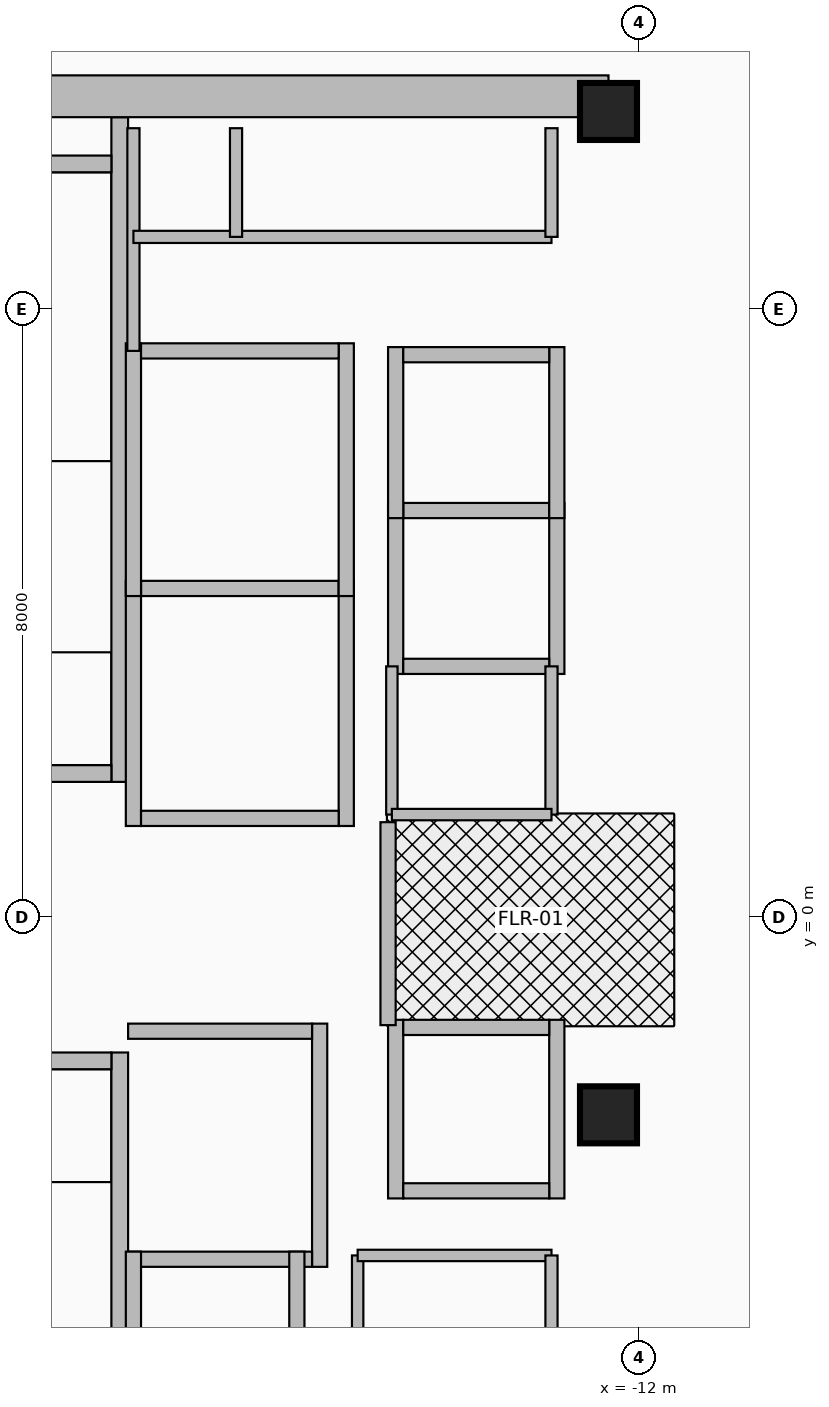
"""IFC4 building model, lengths in metres.
Left out: names, types, materials, properties, quantities, classifications, styles, units other than length and angle.
Written with IfcOpenShell. Run it as: python <this file> out.ifc"""

import sys

from ifc_helpers import new_model, si_unit, direction, frame, frame_2d, origin, origin_2d, place, context, subcontext, project, spatial, rectangle, extrude, source, transform, mapped, element, fill, save


model = new_model("IFC4")
c1 = context("Model", 3, precision=1e-05, world=origin(), true_north=direction((0.0, 1.0)))
c2 = subcontext(c1, "Body", "Model", "MODEL_VIEW")
j1 = project(units=[si_unit("LENGTHUNIT", "METRE"), si_unit("PLANEANGLEUNIT", "RADIAN")], contexts=[c1])
p1 = place(None, origin())
s1 = spatial("IfcSite", under=j1, at=p1, CompositionType="ELEMENT")
p2 = place(p1, origin())
s2 = spatial("IfcBuilding", under=s1, at=p2, CompositionType="ELEMENT")
p3 = place(p2, frame((0.0, 0.0, 290.6)))
s3 = spatial("IfcBuildingStorey", under=s2, at=p3, CompositionType="ELEMENT", Elevation=290.6)
p4 = place(p3, frame((-18.83, 1.78, 0.0), z_axis=(0.0, 0.0, 1.0), x_axis=(0.0, 1.0, 0.0)))
e1 = element("IfcWall", 1, at=p4, inside=s3, PredefinedType="SHEAR", context=c2, shape_type="SweptSolid", body=[
    extrude(rectangle(XDim=8.745, YDim=0.22, at=frame_2d((4.373, 0.0))), origin(), (0.0, 0.0, 1.0), 3.36),
])
p5 = place(p3, frame((-22.05, 1.89, 0.0), z_axis=(0.0, 0.0, 1.0), x_axis=(1.0, 0.0, 0.0)))
e2 = element("IfcWall", 2, at=p5, inside=s3, PredefinedType="SHEAR", context=c2, shape_type="SweptSolid", body=[
    extrude(rectangle(XDim=3.11, YDim=0.22, at=frame_2d((1.555, 0.0))), origin(), (0.0, 0.0, 1.0), 3.36),
])
p6 = place(p5, frame((1.0, 0.0, 0.0)))
e3 = element("IfcOpeningElement", 3, at=p6, cuts=e2, PredefinedType="OPENING", context=c2, shape_type="SweptSolid", body=[
    extrude(rectangle(XDim=1.1, YDim=2.15, at=frame_2d((0.55, 1.075))), frame((0.0, 0.125, 0.0), z_axis=(0.0, -1.0, 0.0), x_axis=(1.0, 0.0, 0.0)), (0.0, 0.0, 1.0), 0.25),
])
p7 = place(p3, frame((-22.05, 9.91, 0.0), z_axis=(0.0, 0.0, 1.0), x_axis=(1.0, 0.0, 0.0)))
e4 = element("IfcWall", 4, at=p7, inside=s3, PredefinedType="SHEAR", context=c2, shape_type="SweptSolid", body=[
    extrude(rectangle(XDim=3.11, YDim=0.22, at=frame_2d((1.555, 0.0))), origin(), (0.0, 0.0, 1.0), 3.36),
])
p8 = place(p3, frame((-18.83, -10.525, 0.0), z_axis=(0.0, 0.0, 1.0), x_axis=(0.0, 1.0, 0.0)))
e5 = element("IfcWall", 5, at=p8, inside=s3, PredefinedType="SHEAR", context=c2, shape_type="SweptSolid", body=[
    extrude(rectangle(XDim=8.745, YDim=0.22, at=frame_2d((4.373, 0.0))), origin(), (0.0, 0.0, 1.0), 3.36),
])
p9 = place(p3, frame((-22.05, -1.89, 0.0), z_axis=(0.0, 0.0, 1.0), x_axis=(1.0, 0.0, 0.0)))
e6 = element("IfcWall", 6, at=p9, inside=s3, PredefinedType="SHEAR", context=c2, shape_type="SweptSolid", body=[
    extrude(rectangle(XDim=3.11, YDim=0.22, at=frame_2d((1.555, 0.0))), origin(), (0.0, 0.0, 1.0), 3.36),
])
p10 = place(p9, frame((1.0, 0.0, 0.0)))
e7 = element("IfcOpeningElement", 7, at=p10, cuts=e6, PredefinedType="OPENING", context=c2, shape_type="SweptSolid", body=[
    extrude(rectangle(XDim=1.1, YDim=2.15, at=frame_2d((0.55, 1.075))), frame((0.0, 0.125, 0.0), z_axis=(0.0, -1.0, 0.0), x_axis=(1.0, 0.0, 0.0)), (0.0, 0.0, 1.0), 0.25),
])
p11 = place(p3, frame((-22.65, 10.8, 0.0), z_axis=(0.0, 0.0, 1.0), x_axis=(1.0, 0.0, 0.0)))
e8 = element("IfcWall", 8, at=p11, inside=s3, PredefinedType="SHEAR", context=c2, shape_type="SweptSolid", body=[
    extrude(rectangle(XDim=10.25, YDim=0.55, at=frame_2d((5.125, 0.0))), origin(), (0.0, 0.0, 1.0), 3.36),
])
m1 = source(origin(), c2, "Body", "SweptSolid", [
    extrude(rectangle(XDim=0.75, YDim=0.75, at=origin_2d()), origin(), (0.0, 0.0, 1.0), 3.6),
])
for number, where, z_axis, x_axis in (
    (9, (-12.4, -2.6, 0.0), (0.0, 0.0, 1.0), (1.0, 0.0, 0.0)),
    (10, (-12.4, 10.6, 0.0), (0.0, 0.0, 1.0), (1.0, 0.0, 0.0)),
):
    element("IfcColumn", number, at=place(p3, frame(where, z_axis=z_axis, x_axis=x_axis)), inside=s3, PredefinedType="COLUMN", context=c2, shape_type="MappedRepresentation", body=[
        mapped(m1, transform((0.0, 0.0, 0.0), x_axis=(1.0, 0.0, 0.0), y_axis=(0.0, 1.0, 0.0), z_axis=(0.0, 0.0, 1.0), scale=1.0)),
    ])
for number, where, z_axis, x_axis in (
    (11, (-18.65, 1.2, 0.0), (0.0, 0.0, 1.0), (0.0, 1.0, 0.0)),
    (12, (-15.85, 1.2, 0.0), (0.0, 0.0, 1.0), (0.0, 1.0, 0.0)),
):
    element("IfcWall", number, at=place(p3, frame(where, z_axis=z_axis, x_axis=x_axis)), inside=s3, PredefinedType="MOVABLE", context=c2, shape_type="SweptSolid", body=[
        extrude(rectangle(XDim=3.225, YDim=0.2, at=frame_2d((1.613, 0.0))), origin(), (0.0, 0.0, 1.0), 3.36),
    ])
p12 = place(p3, frame((-18.55, 1.3, 0.0), z_axis=(0.0, 0.0, 1.0), x_axis=(1.0, 0.0, 0.0)))
e13 = element("IfcWall", 13, at=p12, inside=s3, PredefinedType="MOVABLE", context=c2, shape_type="SweptSolid", body=[
    extrude(rectangle(XDim=2.6, YDim=0.2, at=frame_2d((1.3, 0.0))), origin(), (0.0, 0.0, 1.0), 3.36),
])
p13 = place(p12, frame((0.7, 0.0, 0.0)))
e14 = element("IfcOpeningElement", 14, at=p13, cuts=e13, PredefinedType="OPENING", context=c2, shape_type="SweptSolid", body=[
    extrude(rectangle(XDim=1.2, YDim=2.1, at=frame_2d((0.6, 1.05))), frame((0.0, 0.115, 0.0), z_axis=(0.0, -1.0, 0.0), x_axis=(1.0, 0.0, 0.0)), (0.0, 0.0, 1.0), 0.23),
])
p14 = place(p3, frame((-18.55, 4.325, 0.0), z_axis=(0.0, 0.0, 1.0), x_axis=(1.0, 0.0, 0.0)))
e15 = element("IfcWall", 15, at=p14, inside=s3, PredefinedType="MOVABLE", context=c2, shape_type="SweptSolid", body=[
    extrude(rectangle(XDim=2.6, YDim=0.2, at=frame_2d((1.3, 0.0))), origin(), (0.0, 0.0, 1.0), 3.36),
])
p15 = place(p3, frame((-16.2, -4.6, 0.0), z_axis=(0.0, 0.0, 1.0), x_axis=(0.0, 1.0, 0.0)))
e16 = element("IfcWall", 16, at=p15, inside=s3, PredefinedType="MOVABLE", context=c2, shape_type="SweptSolid", body=[
    extrude(rectangle(XDim=3.2, YDim=0.2, at=frame_2d((1.6, 0.0))), origin(), (0.0, 0.0, 1.0), 3.36),
])
p16 = place(p3, frame((-18.72, -4.5, 0.0), z_axis=(0.0, 0.0, 1.0), x_axis=(1.0, 0.0, 0.0)))
e17 = element("IfcWall", 17, at=p16, inside=s3, PredefinedType="MOVABLE", context=c2, shape_type="SweptSolid", body=[
    extrude(rectangle(XDim=2.42, YDim=0.2, at=frame_2d((1.21, 0.0))), origin(), (0.0, 0.0, 1.0), 3.36),
])
p17 = place(p3, frame((-18.72, -1.5, 0.0), z_axis=(0.0, 0.0, 1.0), x_axis=(1.0, 0.0, 0.0)))
e18 = element("IfcWall", 18, at=p17, inside=s3, PredefinedType="MOVABLE", context=c2, shape_type="SweptSolid", body=[
    extrude(rectangle(XDim=2.42, YDim=0.2, at=frame_2d((1.21, 0.0))), origin(), (0.0, 0.0, 1.0), 3.36),
])
p18 = place(p17, frame((0.61, 0.0, 0.0)))
e19 = element("IfcOpeningElement", 19, at=p18, cuts=e18, PredefinedType="OPENING", context=c2, shape_type="SweptSolid", body=[
    extrude(rectangle(XDim=1.2, YDim=2.1, at=frame_2d((0.6, 1.05))), frame((0.0, 0.115, 0.0), z_axis=(0.0, -1.0, 0.0), x_axis=(1.0, 0.0, 0.0)), (0.0, 0.0, 1.0), 0.23),
])
for number, where, z_axis, x_axis in (
    (20, (-18.65, 4.225, 0.0), (0.0, 0.0, 1.0), (0.0, 1.0, 0.0)),
    (21, (-15.85, 4.225, 0.0), (0.0, 0.0, 1.0), (0.0, 1.0, 0.0)),
):
    element("IfcWall", number, at=place(p3, frame(where, z_axis=z_axis, x_axis=x_axis)), inside=s3, PredefinedType="MOVABLE", context=c2, shape_type="SweptSolid", body=[
        extrude(rectangle(XDim=3.325, YDim=0.2, at=frame_2d((1.663, 0.0))), origin(), (0.0, 0.0, 1.0), 3.36),
    ])
p19 = place(p3, frame((-18.55, 7.45, 0.0), z_axis=(0.0, 0.0, 1.0), x_axis=(1.0, 0.0, 0.0)))
e22 = element("IfcWall", 22, at=p19, inside=s3, PredefinedType="MOVABLE", context=c2, shape_type="SweptSolid", body=[
    extrude(rectangle(XDim=2.6, YDim=0.2, at=frame_2d((1.3, 0.0))), origin(), (0.0, 0.0, 1.0), 3.36),
])
p20 = place(p19, frame((0.7, 0.0, 0.0)))
e23 = element("IfcOpeningElement", 23, at=p20, cuts=e22, PredefinedType="OPENING", context=c2, shape_type="SweptSolid", body=[
    extrude(rectangle(XDim=1.2, YDim=2.1, at=frame_2d((0.6, 1.05))), frame((0.0, 0.115, 0.0), z_axis=(0.0, -1.0, 0.0), x_axis=(1.0, 0.0, 0.0)), (0.0, 0.0, 1.0), 0.23),
])
p21 = place(p3, frame((-15.2, 3.2, 0.0), z_axis=(0.0, 0.0, 1.0), x_axis=(0.0, 1.0, 0.0)))
e24 = element("IfcWall", 24, at=p21, inside=s3, PredefinedType="MOVABLE", context=c2, shape_type="SweptSolid", body=[
    extrude(rectangle(XDim=2.25, YDim=0.2, at=frame_2d((1.125, 0.0))), origin(), (0.0, 0.0, 1.0), 3.36),
])
p22 = place(p3, frame((-13.08, 3.2, 0.0), z_axis=(0.0, 0.0, 1.0), x_axis=(0.0, 1.0, 0.0)))
e25 = element("IfcWall", 25, at=p22, inside=s3, PredefinedType="MOVABLE", context=c2, shape_type="SweptSolid", body=[
    extrude(rectangle(XDim=2.25, YDim=0.2, at=frame_2d((1.125, 0.0))), origin(), (0.0, 0.0, 1.0), 3.36),
])
p23 = place(p22, frame((0.575, 0.0, 0.0)))
e26 = element("IfcOpeningElement", 26, at=p23, cuts=e25, PredefinedType="OPENING", context=c2, shape_type="SweptSolid", body=[
    extrude(rectangle(XDim=1.1, YDim=2.1, at=frame_2d((0.55, 1.05))), frame((0.0, 0.115, 0.0), z_axis=(0.0, -1.0, 0.0), x_axis=(1.0, 0.0, 0.0)), (0.0, 0.0, 1.0), 0.23),
])
for number, where, z_axis, x_axis in (
    (27, (-15.1, 3.3, 0.0), (0.0, 0.0, 1.0), (1.0, 0.0, 0.0)),
    (28, (-15.1, 5.35, 0.0), (0.0, 0.0, 1.0), (1.0, 0.0, 0.0)),
):
    element("IfcWall", number, at=place(p3, frame(where, z_axis=z_axis, x_axis=x_axis)), inside=s3, PredefinedType="MOVABLE", context=c2, shape_type="SweptSolid", body=[
        extrude(rectangle(XDim=1.92, YDim=0.2, at=frame_2d((0.96, 0.0))), origin(), (0.0, 0.0, 1.0), 3.36),
    ])
p24 = place(p3, frame((-15.2, 5.25, 0.0), z_axis=(0.0, 0.0, 1.0), x_axis=(0.0, 1.0, 0.0)))
e29 = element("IfcWall", 29, at=p24, inside=s3, PredefinedType="MOVABLE", context=c2, shape_type="SweptSolid", body=[
    extrude(rectangle(XDim=2.25, YDim=0.2, at=frame_2d((1.125, 0.0))), origin(), (0.0, 0.0, 1.0), 3.36),
])
p25 = place(p3, frame((-13.08, 5.25, 0.0), z_axis=(0.0, 0.0, 1.0), x_axis=(0.0, 1.0, 0.0)))
e30 = element("IfcWall", 30, at=p25, inside=s3, PredefinedType="MOVABLE", context=c2, shape_type="SweptSolid", body=[
    extrude(rectangle(XDim=2.25, YDim=0.2, at=frame_2d((1.125, 0.0))), origin(), (0.0, 0.0, 1.0), 3.36),
])
p26 = place(p25, frame((0.575, 0.0, 0.0)))
e31 = element("IfcOpeningElement", 31, at=p26, cuts=e30, PredefinedType="OPENING", context=c2, shape_type="SweptSolid", body=[
    extrude(rectangle(XDim=1.1, YDim=2.1, at=frame_2d((0.55, 1.05))), frame((0.0, 0.115, 0.0), z_axis=(0.0, -1.0, 0.0), x_axis=(1.0, 0.0, 0.0)), (0.0, 0.0, 1.0), 0.23),
])
p27 = place(p3, frame((-15.1, 7.4, 0.0), z_axis=(0.0, 0.0, 1.0), x_axis=(1.0, 0.0, 0.0)))
e32 = element("IfcWall", 32, at=p27, inside=s3, PredefinedType="MOVABLE", context=c2, shape_type="SweptSolid", body=[
    extrude(rectangle(XDim=1.92, YDim=0.2, at=frame_2d((0.96, 0.0))), origin(), (0.0, 0.0, 1.0), 3.36),
])
for number, where, z_axis, x_axis in (
    (33, (-18.65, -6.7, 0.0), (0.0, 0.0, 1.0), (0.0, 1.0, 0.0)),
    (34, (-16.5, -6.7, 0.0), (0.0, 0.0, 1.0), (0.0, 1.0, 0.0)),
):
    element("IfcWall", number, at=place(p3, frame(where, z_axis=z_axis, x_axis=x_axis)), inside=s3, PredefinedType="MOVABLE", context=c2, shape_type="SweptSolid", body=[
        extrude(rectangle(XDim=2.3, YDim=0.2, at=frame_2d((1.15, 0.0))), origin(), (0.0, 0.0, 1.0), 3.36),
    ])
for number, where, z_axis, x_axis in (
    (35, (-15.2, -3.7, 0.0), (0.0, 0.0, 1.0), (0.0, 1.0, 0.0)),
    (36, (-13.08, -3.7, 0.0), (0.0, 0.0, 1.0), (0.0, 1.0, 0.0)),
):
    element("IfcWall", number, at=place(p3, frame(where, z_axis=z_axis, x_axis=x_axis)), inside=s3, PredefinedType="MOVABLE", context=c2, shape_type="SweptSolid", body=[
        extrude(rectangle(XDim=2.35, YDim=0.2, at=frame_2d((1.175, 0.0))), origin(), (0.0, 0.0, 1.0), 3.36),
    ])
p28 = place(p3, frame((-15.1, -3.6, 0.0), z_axis=(0.0, 0.0, 1.0), x_axis=(1.0, 0.0, 0.0)))
e37 = element("IfcWall", 37, at=p28, inside=s3, PredefinedType="MOVABLE", context=c2, shape_type="SweptSolid", body=[
    extrude(rectangle(XDim=1.92, YDim=0.2, at=frame_2d((0.96, 0.0))), origin(), (0.0, 0.0, 1.0), 3.36),
])
p29 = place(p3, frame((-15.1, -1.45, 0.0), z_axis=(0.0, 0.0, 1.0), x_axis=(1.0, 0.0, 0.0)))
e38 = element("IfcWall", 38, at=p29, inside=s3, PredefinedType="MOVABLE", context=c2, shape_type="SweptSolid", body=[
    extrude(rectangle(XDim=1.92, YDim=0.2, at=frame_2d((0.96, 0.0))), origin(), (0.0, 0.0, 1.0), 3.36),
])
p30 = place(p29, frame((0.41, 0.0, 0.0)))
e39 = element("IfcOpeningElement", 39, at=p30, cuts=e38, PredefinedType="OPENING", context=c2, shape_type="SweptSolid", body=[
    extrude(rectangle(XDim=1.1, YDim=2.1, at=frame_2d((0.55, 1.05))), frame((0.0, 0.115, 0.0), z_axis=(0.0, -1.0, 0.0), x_axis=(1.0, 0.0, 0.0)), (0.0, 0.0, 1.0), 0.23),
])
p31 = place(p3, frame((-15.3, -1.42, 0.0), z_axis=(0.0, 0.0, 1.0), x_axis=(0.0, 1.0, 0.0)))
e40 = element("IfcWall", 40, at=p31, inside=s3, PredefinedType="PARTITIONING", context=c2, shape_type="SweptSolid", body=[
    extrude(rectangle(XDim=2.67, YDim=0.2, at=frame_2d((1.335, 0.0))), origin(), (0.0, 0.0, 1.0), 3.36),
])
p32 = place(p31, frame((0.78, 0.0, 0.0)))
e41 = element("IfcOpeningElement", 41, at=p32, cuts=e40, PredefinedType="OPENING", context=c2, shape_type="SweptSolid", body=[
    extrude(rectangle(XDim=1.05, YDim=2.15, at=frame_2d((0.525, 1.075))), frame((0.0, 0.115, 0.0), z_axis=(0.0, -1.0, 0.0), x_axis=(1.0, 0.0, 0.0)), (0.0, 0.0, 1.0), 0.23),
])
p33 = place(p3, frame((-18.65, 7.45, 0.0), z_axis=(0.0, 0.0, 1.0), x_axis=(0.0, 1.0, 0.0)))
e42 = element("IfcWall", 42, at=p33, inside=s3, PredefinedType="PARTITIONING", context=c2, shape_type="SweptSolid", body=[
    extrude(rectangle(XDim=2.93, YDim=0.16, at=frame_2d((1.465, 0.0))), origin(), (0.0, 0.0, 1.0), 3.36),
])
p34 = place(p3, frame((-18.65, 8.95, 0.0), z_axis=(0.0, 0.0, 1.0), x_axis=(1.0, 0.0, 0.0)))
e43 = element("IfcWall", 43, at=p34, inside=s3, PredefinedType="PARTITIONING", context=c2, shape_type="SweptSolid", body=[
    extrude(rectangle(XDim=5.5, YDim=0.16, at=frame_2d((2.75, 0.0))), origin(), (0.0, 0.0, 1.0), 3.36),
])
p35 = place(p34, frame((0.3, 0.0, 0.0)))
e44 = element("IfcOpeningElement", 44, at=p35, cuts=e43, PredefinedType="OPENING", context=c2, shape_type="SweptSolid", body=[
    extrude(rectangle(XDim=0.85, YDim=2.05, at=frame_2d((0.425, 1.025))), frame((0.0, 0.095, 0.0), z_axis=(0.0, -1.0, 0.0), x_axis=(1.0, 0.0, 0.0)), (0.0, 0.0, 1.0), 0.19),
])
p36 = place(p34, frame((2.5, 0.0, 0.0)))
e45 = element("IfcOpeningElement", 45, at=p36, cuts=e43, PredefinedType="OPENING", context=c2, shape_type="SweptSolid", body=[
    extrude(rectangle(XDim=0.95, YDim=2.15, at=frame_2d((0.475, 1.075))), frame((0.0, 0.095, 0.0), z_axis=(0.0, -1.0, 0.0), x_axis=(1.0, 0.0, 0.0)), (0.0, 0.0, 1.0), 0.19),
])
for number, where, z_axis, x_axis in (
    (46, (-13.15, 8.95, 0.0), (0.0, 0.0, 1.0), (0.0, 1.0, 0.0)),
    (47, (-17.3, 8.95, 0.0), (0.0, 0.0, 1.0), (0.0, 1.0, 0.0)),
):
    element("IfcWall", number, at=place(p3, frame(where, z_axis=z_axis, x_axis=x_axis)), inside=s3, PredefinedType="PARTITIONING", context=c2, shape_type="SweptSolid", body=[
        extrude(rectangle(XDim=1.43, YDim=0.16, at=frame_2d((0.715, 0.0))), origin(), (0.0, 0.0, 1.0), 3.36),
    ])
p37 = place(p3, frame((-15.7, -6.58, 0.0), z_axis=(0.0, 0.0, 1.0), x_axis=(0.0, 1.0, 0.0)))
e48 = element("IfcWall", 48, at=p37, inside=s3, PredefinedType="PARTITIONING", context=c2, shape_type="SweptSolid", body=[
    extrude(rectangle(XDim=2.13, YDim=0.15, at=frame_2d((1.065, 0.0))), origin(), (0.0, 0.0, 1.0), 3.36),
])
p38 = place(p3, frame((-15.7, -4.45, 0.0), z_axis=(0.0, 0.0, 1.0), x_axis=(1.0, 0.0, 0.0)))
e49 = element("IfcWall", 49, at=p38, inside=s3, PredefinedType="PARTITIONING", context=c2, shape_type="SweptSolid", body=[
    extrude(rectangle(XDim=2.55, YDim=0.15, at=frame_2d((1.275, 0.0))), origin(), (0.0, 0.0, 1.0), 3.36),
])
p39 = place(p3, frame((-13.15, -6.58, 0.0), z_axis=(0.0, 0.0, 1.0), x_axis=(0.0, 1.0, 0.0)))
e50 = element("IfcWall", 50, at=p39, inside=s3, PredefinedType="PARTITIONING", context=c2, shape_type="SweptSolid", body=[
    extrude(rectangle(XDim=2.13, YDim=0.16, at=frame_2d((1.065, 0.0))), origin(), (0.0, 0.0, 1.0), 3.36),
])
p40 = place(p3, frame((-13.15, 1.35, 0.0), z_axis=(0.0, 0.0, 1.0), x_axis=(0.0, 1.0, 0.0)))
e51 = element("IfcWall", 51, at=p40, inside=s3, PredefinedType="PARTITIONING", context=c2, shape_type="SweptSolid", body=[
    extrude(rectangle(XDim=1.95, YDim=0.16, at=frame_2d((0.975, 0.0))), origin(), (0.0, 0.0, 1.0), 3.36),
])
p41 = place(p3, frame((-15.25, 1.35, 0.0), z_axis=(0.0, 0.0, 1.0), x_axis=(0.0, 1.0, 0.0)))
e52 = element("IfcWall", 52, at=p41, inside=s3, PredefinedType="PARTITIONING", context=c2, shape_type="SweptSolid", body=[
    extrude(rectangle(XDim=1.95, YDim=0.15, at=frame_2d((0.975, 0.0))), origin(), (0.0, 0.0, 1.0), 3.36),
])
p42 = place(p3, frame((-15.25, 1.35, 0.0), z_axis=(0.0, 0.0, 1.0), x_axis=(1.0, 0.0, 0.0)))
e53 = element("IfcWall", 53, at=p42, inside=s3, PredefinedType="PARTITIONING", context=c2, shape_type="SweptSolid", body=[
    extrude(rectangle(XDim=2.1, YDim=0.15, at=frame_2d((1.05, 0.0))), origin(), (0.0, 0.0, 1.0), 3.36),
])
p43 = place(p42, frame((0.3, 0.0, 0.0)))
e54 = element("IfcOpeningElement", 54, at=p43, cuts=e53, PredefinedType="OPENING", context=c2, shape_type="SweptSolid", body=[
    extrude(rectangle(XDim=0.85, YDim=2.05, at=frame_2d((0.425, 1.025))), frame((0.0, 0.09, 0.0), z_axis=(0.0, -1.0, 0.0), x_axis=(1.0, 0.0, 0.0)), (0.0, 0.0, 1.0), 0.18),
])
p44 = place(p13, origin())
e55 = element("IfcDoor", 55, at=p44, inside=s3, OperationType="DOUBLE_DOOR_SLIDING", PredefinedType="DOOR", context=c2, shape_type="SweptSolid", body=[
    extrude(rectangle(XDim=1.2, YDim=2.1, at=frame_2d((0.6, 1.05))), frame((0.0, 0.025, 0.0), z_axis=(0.0, -1.0, 0.0), x_axis=(1.0, 0.0, 0.0)), (0.0, 0.0, 1.0), 0.05),
])
fill(e14, e55)
p45 = place(p18, origin())
e56 = element("IfcDoor", 56, at=p45, inside=s3, OperationType="DOUBLE_DOOR_SLIDING", PredefinedType="DOOR", context=c2, shape_type="SweptSolid", body=[
    extrude(rectangle(XDim=1.2, YDim=2.1, at=frame_2d((0.6, 1.05))), frame((0.0, 0.025, 0.0), z_axis=(0.0, -1.0, 0.0), x_axis=(1.0, 0.0, 0.0)), (0.0, 0.0, 1.0), 0.05),
])
fill(e19, e56)
p46 = place(p20, origin())
e57 = element("IfcDoor", 57, at=p46, inside=s3, OperationType="DOUBLE_DOOR_SLIDING", PredefinedType="DOOR", context=c2, shape_type="SweptSolid", body=[
    extrude(rectangle(XDim=1.2, YDim=2.1, at=frame_2d((0.6, 1.05))), frame((0.0, 0.025, 0.0), z_axis=(0.0, -1.0, 0.0), x_axis=(1.0, 0.0, 0.0)), (0.0, 0.0, 1.0), 0.05),
])
fill(e23, e57)
p47 = place(p23, origin())
e58 = element("IfcDoor", 58, at=p47, inside=s3, OperationType="DOUBLE_DOOR_SLIDING", PredefinedType="DOOR", context=c2, shape_type="SweptSolid", body=[
    extrude(rectangle(XDim=1.1, YDim=2.1, at=frame_2d((0.55, 1.05))), frame((0.0, 0.025, 0.0), z_axis=(0.0, -1.0, 0.0), x_axis=(1.0, 0.0, 0.0)), (0.0, 0.0, 1.0), 0.05),
])
fill(e26, e58)
p48 = place(p26, origin())
e59 = element("IfcDoor", 59, at=p48, inside=s3, OperationType="DOUBLE_DOOR_SLIDING", PredefinedType="DOOR", context=c2, shape_type="SweptSolid", body=[
    extrude(rectangle(XDim=1.1, YDim=2.1, at=frame_2d((0.55, 1.05))), frame((0.0, 0.025, 0.0), z_axis=(0.0, -1.0, 0.0), x_axis=(1.0, 0.0, 0.0)), (0.0, 0.0, 1.0), 0.05),
])
fill(e31, e59)
p49 = place(p30, origin())
e60 = element("IfcDoor", 60, at=p49, inside=s3, OperationType="DOUBLE_DOOR_SLIDING", PredefinedType="DOOR", context=c2, shape_type="SweptSolid", body=[
    extrude(rectangle(XDim=1.1, YDim=2.1, at=frame_2d((0.55, 1.05))), frame((0.0, 0.025, 0.0), z_axis=(0.0, -1.0, 0.0), x_axis=(1.0, 0.0, 0.0)), (0.0, 0.0, 1.0), 0.05),
])
fill(e39, e60)
p50 = place(p32, origin())
e61 = element("IfcDoor", 61, at=p50, inside=s3, OperationType="SINGLE_SWING_RIGHT", PredefinedType="DOOR", context=c2, shape_type="SweptSolid", body=[
    extrude(rectangle(XDim=1.05, YDim=2.15, at=frame_2d((0.525, 1.075))), frame((0.0, 0.025, 0.0), z_axis=(0.0, -1.0, 0.0), x_axis=(1.0, 0.0, 0.0)), (0.0, 0.0, 1.0), 0.05),
])
fill(e41, e61)
p51 = place(p35, origin())
e62 = element("IfcDoor", 62, at=p51, inside=s3, OperationType="SINGLE_SWING_LEFT", PredefinedType="DOOR", context=c2, shape_type="SweptSolid", body=[
    extrude(rectangle(XDim=0.85, YDim=2.05, at=frame_2d((0.425, 1.025))), frame((0.0, 0.025, 0.0), z_axis=(0.0, -1.0, 0.0), x_axis=(1.0, 0.0, 0.0)), (0.0, 0.0, 1.0), 0.05),
])
fill(e44, e62)
p52 = place(p36, origin())
e63 = element("IfcDoor", 63, at=p52, inside=s3, OperationType="SINGLE_SWING_RIGHT", PredefinedType="DOOR", context=c2, shape_type="SweptSolid", body=[
    extrude(rectangle(XDim=0.95, YDim=2.15, at=frame_2d((0.475, 1.075))), frame((0.0, 0.025, 0.0), z_axis=(0.0, -1.0, 0.0), x_axis=(1.0, 0.0, 0.0)), (0.0, 0.0, 1.0), 0.05),
])
fill(e45, e63)
p53 = place(p43, origin())
e64 = element("IfcDoor", 64, at=p53, inside=s3, OperationType="SINGLE_SWING_LEFT", PredefinedType="DOOR", context=c2, shape_type="SweptSolid", body=[
    extrude(rectangle(XDim=0.85, YDim=2.05, at=frame_2d((0.425, 1.025))), frame((0.0, 0.025, 0.0), z_axis=(0.0, -1.0, 0.0), x_axis=(1.0, 0.0, 0.0)), (0.0, 0.0, 1.0), 0.05),
])
fill(e54, e64)
save(model, sys.argv[1])
